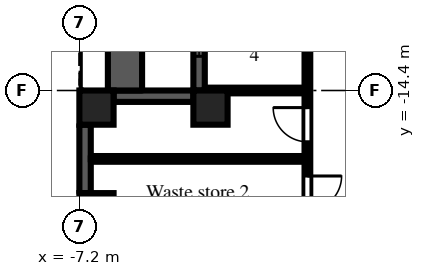
"""IFC4 building model, lengths in metres.
Left out: names, types, materials, properties, quantities, classifications, styles, units other than length and angle.
Written with IfcOpenShell. Run it as: python <this file> out.ifc"""

import sys

from ifc_helpers import new_model, si_unit, direction, frame, frame_2d, origin, origin_2d, place, context, subcontext, project, spatial, rectangle, extrude, element, fill, save


model = new_model("IFC4")
c1 = context("Model", 3, precision=1e-05, world=origin(), true_north=direction((0.0, 1.0)))
c2 = subcontext(c1, "Body", "Model", "MODEL_VIEW")
j1 = project(units=[si_unit("LENGTHUNIT", "METRE"), si_unit("PLANEANGLEUNIT", "RADIAN")], contexts=[c1])
p1 = place(None, origin())
s1 = spatial("IfcSite", under=j1, at=p1, CompositionType="ELEMENT")
p2 = place(p1, origin())
s2 = spatial("IfcBuilding", under=s1, at=p2, CompositionType="ELEMENT")
p3 = place(p2, frame((0.0, 0.0, 108.9)))
s3 = spatial("IfcBuildingStorey", under=s2, at=p3, CompositionType="ELEMENT", Elevation=108.9)
for number, where, z_axis, x_axis in (
    (1, (-6.75, -17.55, 0.0), (0.0, 0.0, 1.0), (1.0, 0.0, 0.0)),
    (2, (-6.75, -14.85, 0.0), (0.0, 0.0, 1.0), (1.0, 0.0, 0.0)),
    (3, (-3.75, -14.85, 0.0), (0.0, 0.0, 1.0), (1.0, 0.0, 0.0)),
):
    element("IfcColumn", number, at=place(p3, frame(where, z_axis=z_axis, x_axis=x_axis)), inside=s3, PredefinedType="COLUMN", context=c2, shape_type="SweptSolid", body=[
        extrude(rectangle(XDim=0.9, YDim=0.9, at=origin_2d()), origin(), (0.0, 0.0, 1.0), 3.0),
    ])
p4 = place(p3, frame((-4.05, -7.2, 0.0), z_axis=(0.0, 0.0, 1.0), x_axis=(0.0, -1.0, 0.0)))
e4 = element("IfcWall", 4, at=p4, inside=s3, PredefinedType="SOLIDWALL", context=c2, shape_type="SweptSolid", body=[
    extrude(rectangle(XDim=7.2, YDim=0.3, at=frame_2d((3.6, 0.0))), origin(), (0.0, 0.0, 1.0), 2.55),
])
p5 = place(p4, frame((3.0, 0.0, 0.0)))
e5 = element("IfcOpeningElement", 5, at=p5, cuts=e4, PredefinedType="OPENING", context=c2, shape_type="SweptSolid", body=[
    extrude(rectangle(XDim=1.2, YDim=2.05, at=frame_2d((0.6, 1.025))), frame((0.0, 0.16, 0.0), z_axis=(0.0, -1.0, 0.0), x_axis=(1.0, 0.0, 0.0)), (0.0, 0.0, 1.0), 0.32),
])
p6 = place(p4, frame((0.9, 0.0, 0.2)))
e6 = element("IfcOpeningElement", 6, at=p6, cuts=e4, PredefinedType="OPENING", context=c2, shape_type="SweptSolid", body=[
    extrude(rectangle(XDim=1.8, YDim=1.85, at=frame_2d((0.9, 0.925))), frame((0.0, 0.16, 0.0), z_axis=(0.0, -1.0, 0.0), x_axis=(1.0, 0.0, 0.0)), (0.0, 0.0, 1.0), 0.32),
])
p7 = place(p4, frame((4.5, 0.0, 0.2)))
e7 = element("IfcOpeningElement", 7, at=p7, cuts=e4, PredefinedType="OPENING", context=c2, shape_type="SweptSolid", body=[
    extrude(rectangle(XDim=1.8, YDim=1.85, at=frame_2d((0.9, 0.925))), frame((0.0, 0.16, 0.0), z_axis=(0.0, -1.0, 0.0), x_axis=(1.0, 0.0, 0.0)), (0.0, 0.0, 1.0), 0.32),
])
p8 = place(p3, frame((-4.2, -14.55, 0.0), z_axis=(0.0, 0.0, 1.0), x_axis=(-1.0, 0.0, 0.0)))
e8 = element("IfcWall", 8, at=p8, inside=s3, PredefinedType="SOLIDWALL", context=c2, shape_type="SweptSolid", body=[
    extrude(rectangle(XDim=2.1, YDim=0.3, at=frame_2d((1.05, 0.0))), origin(), (0.0, 0.0, 1.0), 2.55),
])
p9 = place(p3, frame((-7.05, -15.3, 0.0), z_axis=(0.0, 0.0, 1.0), x_axis=(0.0, -1.0, 0.0)))
e9 = element("IfcWall", 9, at=p9, inside=s3, PredefinedType="SOLIDWALL", context=c2, shape_type="SweptSolid", body=[
    extrude(rectangle(XDim=1.8, YDim=0.3, at=frame_2d((0.9, 0.0))), origin(), (0.0, 0.0, 1.0), 2.2),
])
p10 = place(p3, frame((-6.0, -14.4, 0.0), z_axis=(0.0, 0.0, 1.0), x_axis=(0.0, 1.0, 0.0)))
e10 = element("IfcWall", 10, at=p10, inside=s3, PredefinedType="PARAPET", context=c2, shape_type="SweptSolid", body=[
    extrude(rectangle(XDim=7.2, YDim=0.9, at=frame_2d((3.6, 0.0))), origin(), (0.0, 0.0, 1.0), 0.8),
])
p11 = place(p3, frame((-6.9, -16.2, 0.0), z_axis=(0.0, 0.0, 1.0), x_axis=(1.0, 0.0, 0.0)))
e11 = element("IfcWall", 11, at=p11, inside=s3, PredefinedType="PARTITIONING", context=c2, shape_type="SweptSolid", body=[
    extrude(rectangle(XDim=5.625, YDim=0.15, at=frame_2d((2.812, 0.0))), origin(), (0.0, 0.0, 1.0), 2.55),
])
p12 = place(p3, frame((-3.9, -14.4, 0.0), z_axis=(0.0, 0.0, 1.0), x_axis=(1.0, 0.0, 0.0)))
e12 = element("IfcWall", 12, at=p12, inside=s3, PredefinedType="PARTITIONING", context=c2, shape_type="SweptSolid", body=[
    extrude(rectangle(XDim=2.625, YDim=0.15, at=frame_2d((1.312, 0.0))), origin(), (0.0, 0.0, 1.0), 2.55),
])
p13 = place(p3, frame((-1.2, -36.5, 0.0), z_axis=(0.0, 0.0, 1.0), x_axis=(0.0, 1.0, 0.0)))
e13 = element("IfcWall", 13, at=p13, inside=s3, PredefinedType="PARTITIONING", context=c2, shape_type="SweptSolid", body=[
    extrude(rectangle(XDim=35.225, YDim=0.15, at=frame_2d((17.613, 0.0))), origin(), (0.0, 0.0, 1.0), 2.55),
])
p14 = place(p13, frame((31.85, 0.0, 0.0)))
e14 = element("IfcOpeningElement", 14, at=p14, cuts=e13, PredefinedType="OPENING", context=c2, shape_type="SweptSolid", body=[
    extrude(rectangle(XDim=0.9, YDim=2.1, at=frame_2d((0.45, 1.05))), frame((0.0, 0.085, 0.0), z_axis=(0.0, -1.0, 0.0), x_axis=(1.0, 0.0, 0.0)), (0.0, 0.0, 1.0), 0.17),
])
p15 = place(p13, frame((27.05, 0.0, 0.0)))
e15 = element("IfcOpeningElement", 15, at=p15, cuts=e13, PredefinedType="OPENING", context=c2, shape_type="SweptSolid", body=[
    extrude(rectangle(XDim=0.9, YDim=2.1, at=frame_2d((0.45, 1.05))), frame((0.0, 0.085, 0.0), z_axis=(0.0, -1.0, 0.0), x_axis=(1.0, 0.0, 0.0)), (0.0, 0.0, 1.0), 0.17),
])
p16 = place(p13, frame((20.75, 0.0, 0.0)))
e16 = element("IfcOpeningElement", 16, at=p16, cuts=e13, PredefinedType="OPENING", context=c2, shape_type="SweptSolid", body=[
    extrude(rectangle(XDim=0.9, YDim=2.1, at=frame_2d((0.45, 1.05))), frame((0.0, 0.085, 0.0), z_axis=(0.0, -1.0, 0.0), x_axis=(1.0, 0.0, 0.0)), (0.0, 0.0, 1.0), 0.17),
])
p17 = place(p13, frame((18.95, 0.0, 0.0)))
e17 = element("IfcOpeningElement", 17, at=p17, cuts=e13, PredefinedType="OPENING", context=c2, shape_type="SweptSolid", body=[
    extrude(rectangle(XDim=0.9, YDim=2.1, at=frame_2d((0.45, 1.05))), frame((0.0, 0.085, 0.0), z_axis=(0.0, -1.0, 0.0), x_axis=(1.0, 0.0, 0.0)), (0.0, 0.0, 1.0), 0.17),
])
p18 = place(p13, frame((1.55, 0.0, 0.0)))
e18 = element("IfcOpeningElement", 18, at=p18, cuts=e13, PredefinedType="OPENING", context=c2, shape_type="SweptSolid", body=[
    extrude(rectangle(XDim=1.0, YDim=2.1, at=frame_2d((0.5, 1.05))), frame((0.0, 0.085, 0.0), z_axis=(0.0, -1.0, 0.0), x_axis=(1.0, 0.0, 0.0)), (0.0, 0.0, 1.0), 0.17),
])
p19 = place(p7, origin())
e19 = element("IfcWindow", 19, at=p19, inside=s3, PartitioningType="SINGLE_PANEL", PredefinedType="WINDOW", context=c2, shape_type="SweptSolid", body=[
    extrude(rectangle(XDim=1.8, YDim=1.85, at=frame_2d((0.9, 0.925))), frame((0.0, 0.03, 0.0), z_axis=(0.0, -1.0, 0.0), x_axis=(1.0, 0.0, 0.0)), (0.0, 0.0, 1.0), 0.06),
])
fill(e7, e19)
p20 = place(p16, origin())
e20 = element("IfcDoor", 20, at=p20, inside=s3, OperationType="SINGLE_SWING_RIGHT", PredefinedType="DOOR", context=c2, shape_type="SweptSolid", body=[
    extrude(rectangle(XDim=0.9, YDim=2.1, at=frame_2d((0.45, 1.05))), frame((0.0, 0.025, 0.0), z_axis=(0.0, -1.0, 0.0), x_axis=(1.0, 0.0, 0.0)), (0.0, 0.0, 1.0), 0.05),
])
fill(e16, e20)
p21 = place(p17, frame((0.9, 0.0, 0.0), z_axis=(0.0, 0.0, 1.0), x_axis=(-1.0, 0.0, 0.0)))
e21 = element("IfcDoor", 21, at=p21, inside=s3, OperationType="SINGLE_SWING_LEFT", PredefinedType="DOOR", context=c2, shape_type="SweptSolid", body=[
    extrude(rectangle(XDim=0.9, YDim=2.1, at=frame_2d((0.45, 1.05))), frame((0.0, 0.025, 0.0), z_axis=(0.0, -1.0, 0.0), x_axis=(1.0, 0.0, 0.0)), (0.0, 0.0, 1.0), 0.05),
])
fill(e17, e21)
save(model, sys.argv[1])
